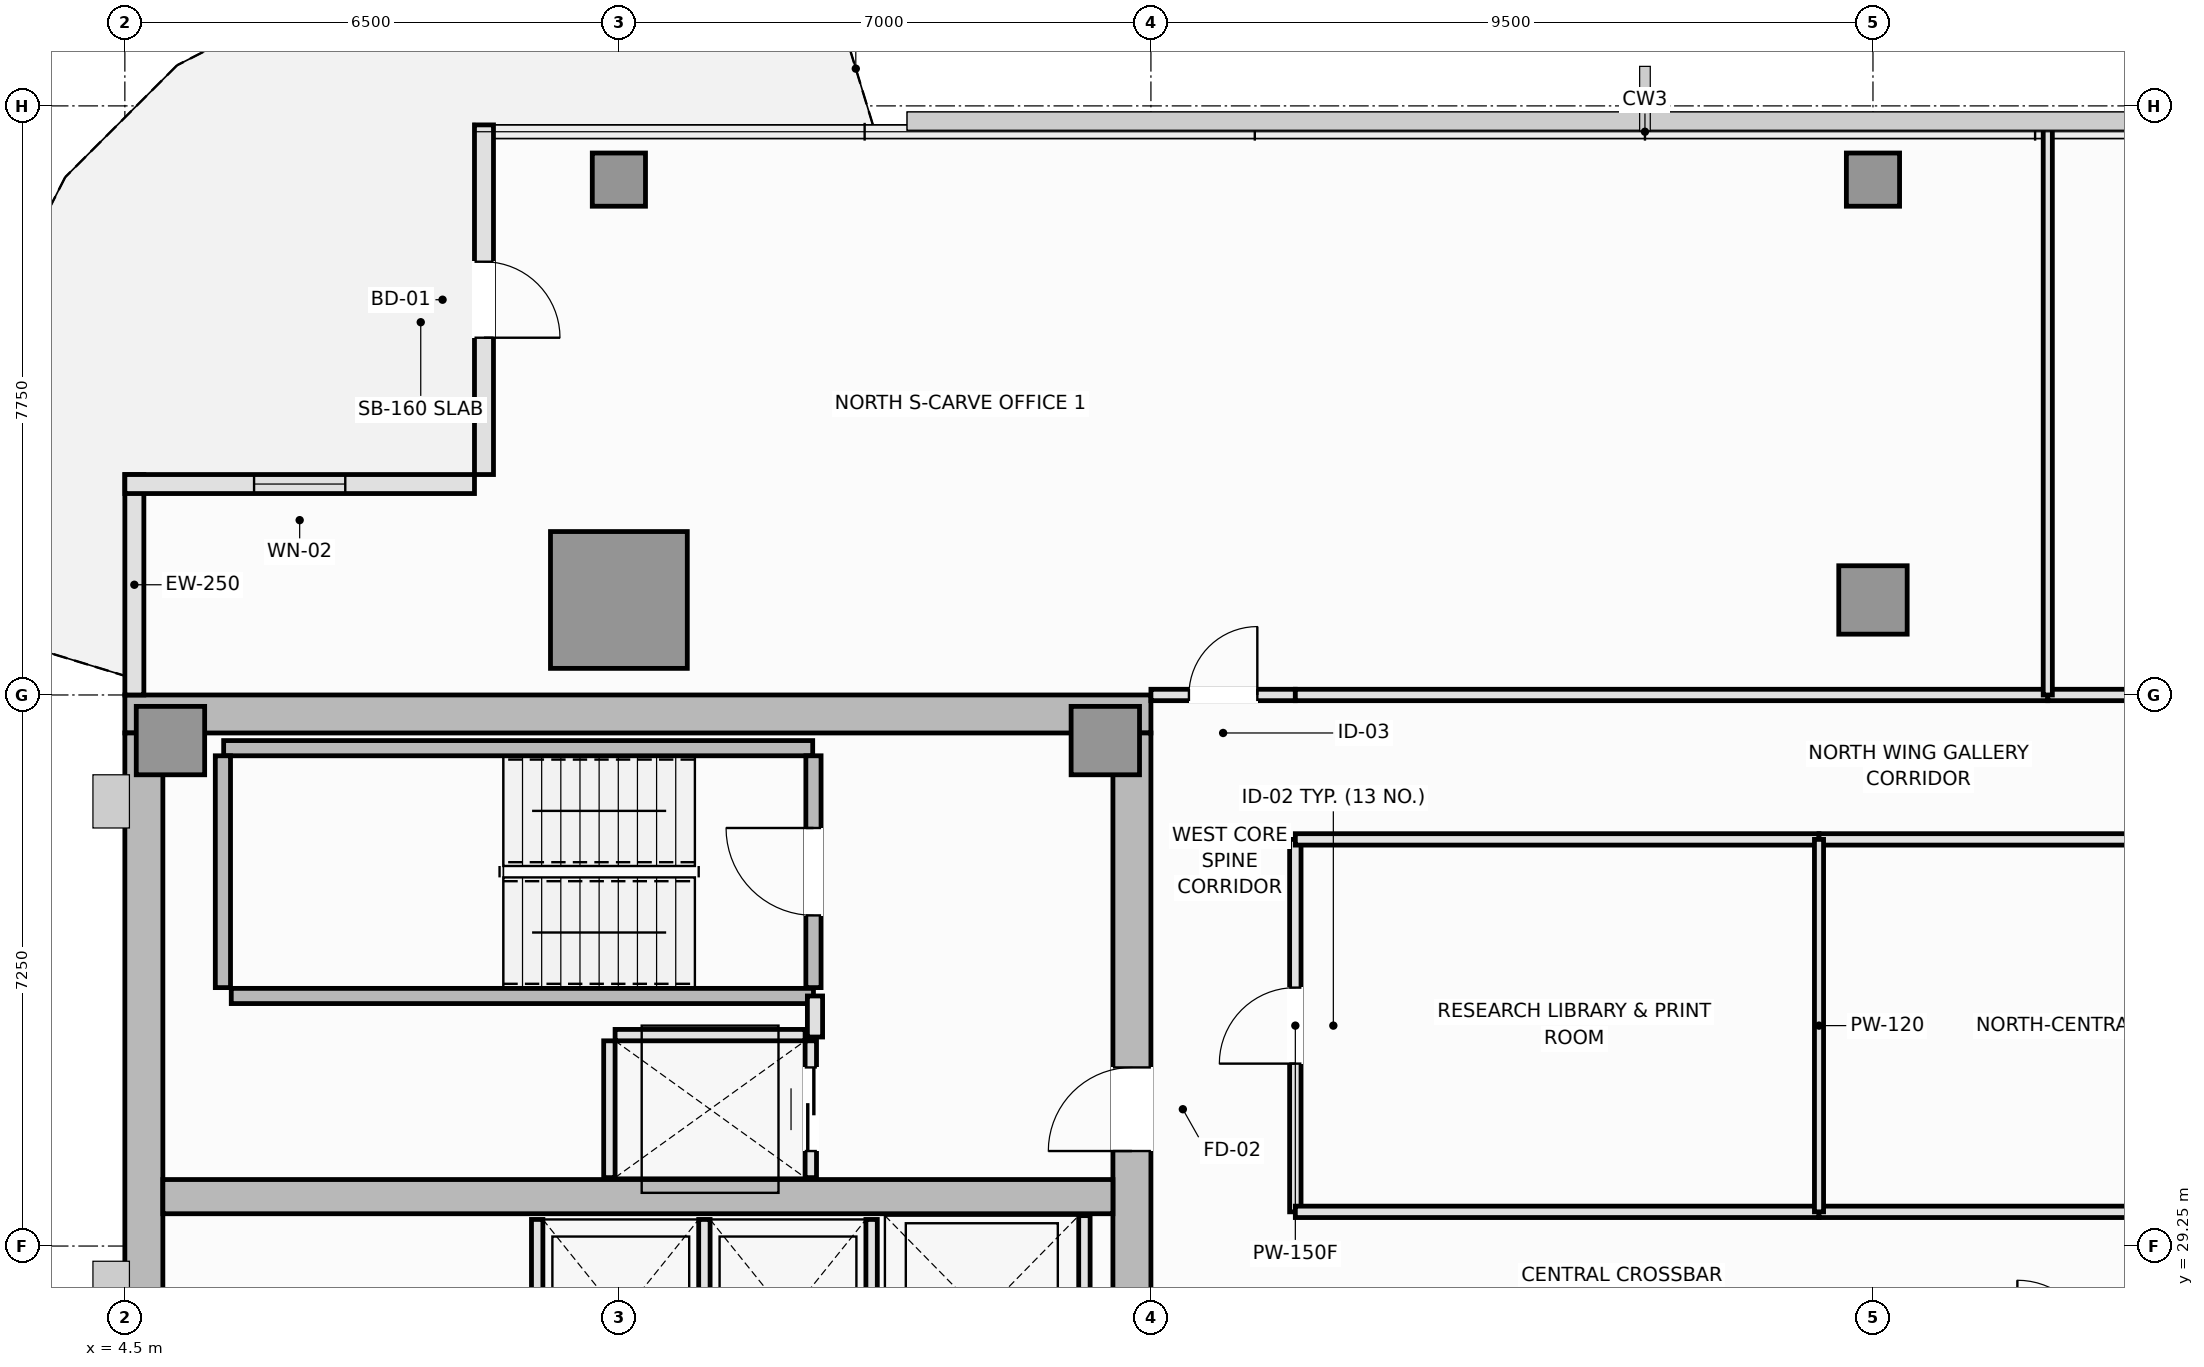
"""IFC4 building model, lengths in metres.
Left out: names, types, materials, properties, quantities, classifications, styles, units other than length and angle.
Written with IfcOpenShell. Run it as: python <this file> out.ifc"""

import sys

from ifc_helpers import new_model, si_unit, direction, frame, frame_2d, origin, origin_2d, place, context, subcontext, project, spatial, rectangle, extrude, element, fill, save


model = new_model("IFC4")
c1 = context("Model", 3, precision=1e-05, world=origin(), true_north=direction((0.0, 1.0)))
c2 = subcontext(c1, "Body", "Model", "MODEL_VIEW")
j1 = project(units=[si_unit("LENGTHUNIT", "METRE"), si_unit("PLANEANGLEUNIT", "RADIAN")], contexts=[c1])
p1 = place(None, origin())
s1 = spatial("IfcSite", under=j1, at=p1, CompositionType="ELEMENT")
p2 = place(p1, origin())
s2 = spatial("IfcBuilding", under=s1, at=p2, CompositionType="ELEMENT")
p3 = place(p2, frame((0.0, 0.0, 281.2)))
s3 = spatial("IfcBuildingStorey", under=s2, at=p3, CompositionType="ELEMENT", Elevation=281.2)
p4 = place(p3, frame((4.5, 36.25, 0.0), z_axis=(0.0, 0.0, 1.0), x_axis=(1.0, 0.0, 0.0)))
e1 = element("IfcWall", 1, at=p4, inside=s3, PredefinedType="SHEAR", context=c2, shape_type="SweptSolid", body=[
    extrude(rectangle(XDim=13.5, YDim=0.5, at=frame_2d((6.75, 0.0))), origin(), (0.0, 0.0, 1.0), 3.55),
])
p5 = place(p3, frame((4.75, 14.5, 0.0), z_axis=(0.0, 0.0, 1.0), x_axis=(0.0, 1.0, 0.0)))
e2 = element("IfcWall", 2, at=p5, inside=s3, PredefinedType="SHEAR", context=c2, shape_type="SweptSolid", body=[
    extrude(rectangle(XDim=21.5, YDim=0.5, at=frame_2d((10.75, 0.0))), origin(), (0.0, 0.0, 1.0), 3.55),
])
p6 = place(p3, frame((17.75, 27.05, 0.0), z_axis=(0.0, 0.0, 1.0), x_axis=(0.0, 1.0, 0.0)))
e3 = element("IfcWall", 3, at=p6, inside=s3, PredefinedType="SHEAR", context=c2, shape_type="SweptSolid", body=[
    extrude(rectangle(XDim=8.95, YDim=0.5, at=frame_2d((4.475, 0.0))), origin(), (0.0, 0.0, 1.0), 3.55),
])
p7 = place(p6, frame((3.45, 0.0, 0.0)))
e4 = element("IfcOpeningElement", 4, at=p7, cuts=e3, PredefinedType="OPENING", context=c2, shape_type="SweptSolid", body=[
    extrude(rectangle(XDim=1.1, YDim=2.15, at=frame_2d((0.55, 1.075))), frame((0.0, 0.26, 0.0), z_axis=(0.0, -1.0, 0.0), x_axis=(1.0, 0.0, 0.0)), (0.0, 0.0, 1.0), 0.52),
])
p8 = place(p3, frame((5.0, 29.9, 0.0), z_axis=(0.0, 0.0, 1.0), x_axis=(1.0, 0.0, 0.0)))
e5 = element("IfcWall", 5, at=p8, inside=s3, PredefinedType="SHEAR", context=c2, shape_type="SweptSolid", body=[
    extrude(rectangle(XDim=12.5, YDim=0.45, at=frame_2d((6.25, 0.0))), origin(), (0.0, 0.0, 1.0), 3.55),
])
for number, where, z_axis, x_axis in (
    (6, (5.1, 35.9, 0.0), (0.0, 0.0, 1.0), (1.0, 0.0, 0.0)),
    (7, (17.4, 35.9, 0.0), (0.0, 0.0, 1.0), (1.0, 0.0, 0.0)),
):
    element("IfcColumn", number, at=place(p3, frame(where, z_axis=z_axis, x_axis=x_axis)), inside=s3, PredefinedType="PILASTER", context=c2, shape_type="SweptSolid", body=[
        extrude(rectangle(XDim=0.9, YDim=0.9, at=origin_2d()), origin(), (0.0, 0.0, 1.0), 3.55),
    ])
p9 = place(p3, frame((11.0, 37.75, 0.0), z_axis=(0.0, 0.0, 1.0), x_axis=(1.0, 0.0, 0.0)))
e8 = element("IfcColumn", 8, at=p9, inside=s3, PredefinedType="COLUMN", context=c2, shape_type="SweptSolid", body=[
    extrude(rectangle(XDim=1.8, YDim=1.8, at=origin_2d()), origin(), (0.0, 0.0, 1.0), 3.55),
])
p10 = place(p3, frame((27.5, 37.75, 0.0), z_axis=(0.0, 0.0, 1.0), x_axis=(1.0, 0.0, 0.0)))
e9 = element("IfcColumn", 9, at=p10, inside=s3, PredefinedType="COLUMN", context=c2, shape_type="SweptSolid", body=[
    extrude(rectangle(XDim=0.9, YDim=0.9, at=origin_2d()), origin(), (0.0, 0.0, 1.0), 3.55),
])
for number, where, z_axis, x_axis in (
    (10, (11.0, 43.28, 0.0), (0.0, 0.0, 1.0), (1.0, 0.0, 0.0)),
    (11, (27.5, 43.28, 0.0), (0.0, 0.0, 1.0), (1.0, 0.0, 0.0)),
):
    element("IfcColumn", number, at=place(p3, frame(where, z_axis=z_axis, x_axis=x_axis)), inside=s3, PredefinedType="COLUMN", context=c2, shape_type="SweptSolid", body=[
        extrude(rectangle(XDim=0.7, YDim=0.7, at=origin_2d()), origin(), (0.0, 0.0, 1.0), 3.55),
    ])
p11 = place(p3, frame((4.625, 39.4, 0.0), z_axis=(0.0, 0.0, 1.0), x_axis=(0.0, -1.0, 0.0)))
e12 = element("IfcWall", 12, at=p11, inside=s3, PredefinedType="SOLIDWALL", context=c2, shape_type="SweptSolid", body=[
    extrude(rectangle(XDim=2.9, YDim=0.25, at=frame_2d((1.45, 0.0))), origin(), (0.0, 0.0, 1.0), 3.39),
])
p12 = place(p3, frame((9.225, 44.0, 0.0), z_axis=(0.0, 0.0, 1.0), x_axis=(0.0, -1.0, 0.0)))
e13 = element("IfcWall", 13, at=p12, inside=s3, PredefinedType="SOLIDWALL", context=c2, shape_type="SweptSolid", body=[
    extrude(rectangle(XDim=4.6, YDim=0.25, at=frame_2d((2.3, 0.0))), origin(), (0.0, 0.0, 1.0), 3.39),
])
p13 = place(p12, frame((1.8, 0.0, 0.0)))
e14 = element("IfcOpeningElement", 14, at=p13, cuts=e13, PredefinedType="OPENING", context=c2, shape_type="SweptSolid", body=[
    extrude(rectangle(XDim=1.0, YDim=2.2, at=frame_2d((0.5, 1.1))), frame((0.0, 0.135, 0.0), z_axis=(0.0, -1.0, 0.0), x_axis=(1.0, 0.0, 0.0)), (0.0, 0.0, 1.0), 0.27),
])
p14 = place(p3, frame((9.1, 39.275, 0.0), z_axis=(0.0, 0.0, 1.0), x_axis=(-1.0, 0.0, 0.0)))
e15 = element("IfcWall", 15, at=p14, inside=s3, PredefinedType="SOLIDWALL", context=c2, shape_type="SweptSolid", body=[
    extrude(rectangle(XDim=4.6, YDim=0.25, at=frame_2d((2.3, 0.0))), origin(), (0.0, 0.0, 1.0), 3.12),
])
p15 = place(p14, frame((1.7, 0.0, 0.9)))
e16 = element("IfcOpeningElement", 16, at=p15, cuts=e15, PredefinedType="OPENING", context=c2, shape_type="SweptSolid", body=[
    extrude(rectangle(XDim=1.2, YDim=1.8, at=frame_2d((0.6, 0.9))), frame((0.0, 0.135, 0.0), z_axis=(0.0, -1.0, 0.0), x_axis=(1.0, 0.0, 0.0)), (0.0, 0.0, 1.0), 0.27),
])
p16 = place(p3, frame((5.8, 35.8, 0.0), z_axis=(0.0, 0.0, 1.0), x_axis=(1.0, 0.0, 0.0)))
e17 = element("IfcWall", 17, at=p16, inside=s3, PredefinedType="SOLIDWALL", context=c2, shape_type="SweptSolid", body=[
    extrude(rectangle(XDim=7.75, YDim=0.2, at=frame_2d((3.875, 0.0))), origin(), (0.0, 0.0, 1.0), 3.55),
])
p17 = place(p3, frame((5.79, 32.65, 0.0), z_axis=(0.0, 0.0, 1.0), x_axis=(0.0, 1.0, 0.0)))
e18 = element("IfcWall", 18, at=p17, inside=s3, PredefinedType="SOLIDWALL", context=c2, shape_type="SweptSolid", body=[
    extrude(rectangle(XDim=3.05, YDim=0.2, at=frame_2d((1.525, 0.0))), origin(), (0.0, 0.0, 1.0), 3.55),
])
p18 = place(p3, frame((5.9, 32.54, 0.0), z_axis=(0.0, 0.0, 1.0), x_axis=(1.0, 0.0, 0.0)))
e19 = element("IfcWall", 19, at=p18, inside=s3, PredefinedType="SOLIDWALL", context=c2, shape_type="SweptSolid", body=[
    extrude(rectangle(XDim=7.66, YDim=0.2, at=frame_2d((3.83, 0.0))), origin(), (0.0, 0.0, 1.0), 3.55),
])
p19 = place(p3, frame((13.56, 32.65, 0.0), z_axis=(0.0, 0.0, 1.0), x_axis=(0.0, 1.0, 0.0)))
e20 = element("IfcWall", 20, at=p19, inside=s3, PredefinedType="SOLIDWALL", context=c2, shape_type="SweptSolid", body=[
    extrude(rectangle(XDim=3.05, YDim=0.2, at=frame_2d((1.525, 0.0))), origin(), (0.0, 0.0, 1.0), 3.55),
])
p20 = place(p19, frame((0.95, 0.0, 0.0)))
e21 = element("IfcOpeningElement", 21, at=p20, cuts=e20, PredefinedType="OPENING", context=c2, shape_type="SweptSolid", body=[
    extrude(rectangle(XDim=1.15, YDim=2.15, at=frame_2d((0.575, 1.075))), frame((0.0, 0.11, 0.0), z_axis=(0.0, -1.0, 0.0), x_axis=(1.0, 0.0, 0.0)), (0.0, 0.0, 1.0), 0.22),
])
for number, where, z_axis, x_axis in (
    (22, (9.925, 27.05, 0.0), (0.0, 0.0, 1.0), (0.0, 1.0, 0.0)),
    (23, (12.125, 27.05, 0.0), (0.0, 0.0, 1.0), (0.0, 1.0, 0.0)),
    (24, (14.325, 27.05, 0.0), (0.0, 0.0, 1.0), (0.0, 1.0, 0.0)),
):
    element("IfcWall", number, at=place(p3, frame(where, z_axis=z_axis, x_axis=x_axis)), inside=s3, PredefinedType="PARTITIONING", context=c2, shape_type="SweptSolid", body=[
        extrude(rectangle(XDim=2.55, YDim=0.15, at=frame_2d((1.275, 0.0))), origin(), (0.0, 0.0, 1.0), 3.39),
    ])
p21 = place(p3, frame((17.125, 27.05, 0.0), z_axis=(0.0, 0.0, 1.0), x_axis=(0.0, 1.0, 0.0)))
e25 = element("IfcWall", 25, at=p21, inside=s3, PredefinedType="PARTITIONING", context=c2, shape_type="SweptSolid", body=[
    extrude(rectangle(XDim=2.6, YDim=0.15, at=frame_2d((1.3, 0.0))), origin(), (0.0, 0.0, 1.0), 3.39),
])
p22 = place(p3, frame((10.95, 32.025, 0.0), z_axis=(0.0, 0.0, 1.0), x_axis=(1.0, 0.0, 0.0)))
e26 = element("IfcWall", 26, at=p22, inside=s3, PredefinedType="PARTITIONING", context=c2, shape_type="SweptSolid", body=[
    extrude(rectangle(XDim=2.5, YDim=0.15, at=frame_2d((1.25, 0.0))), origin(), (0.0, 0.0, 1.0), 3.39),
])
p23 = place(p3, frame((10.875, 30.15, 0.0), z_axis=(0.0, 0.0, 1.0), x_axis=(0.0, 1.0, 0.0)))
e27 = element("IfcWall", 27, at=p23, inside=s3, PredefinedType="PARTITIONING", context=c2, shape_type="SweptSolid", body=[
    extrude(rectangle(XDim=1.8, YDim=0.15, at=frame_2d((0.9, 0.0))), origin(), (0.0, 0.0, 1.0), 3.39),
])
p24 = place(p3, frame((13.525, 30.15, 0.0), z_axis=(0.0, 0.0, 1.0), x_axis=(0.0, 1.0, 0.0)))
e28 = element("IfcWall", 28, at=p24, inside=s3, PredefinedType="PARTITIONING", context=c2, shape_type="SweptSolid", body=[
    extrude(rectangle(XDim=1.8, YDim=0.15, at=frame_2d((0.9, 0.0))), origin(), (0.0, 0.0, 1.0), 3.39),
])
p25 = place(p24, frame((0.35, 0.0, 0.0)))
e29 = element("IfcOpeningElement", 29, at=p25, cuts=e28, PredefinedType="OPENING", context=c2, shape_type="SweptSolid", body=[
    extrude(rectangle(XDim=1.1, YDim=2.2, at=frame_2d((0.55, 1.1))), frame((0.0, 0.085, 0.0), z_axis=(0.0, -1.0, 0.0), x_axis=(1.0, 0.0, 0.0)), (0.0, 0.0, 1.0), 0.17),
])
p26 = place(p3, frame((13.58, 32.0, 0.0), z_axis=(0.0, 0.0, 1.0), x_axis=(0.0, 1.0, 0.0)))
e30 = element("IfcWall", 30, at=p26, inside=s3, PredefinedType="PARTITIONING", context=c2, shape_type="SweptSolid", body=[
    extrude(rectangle(XDim=0.54, YDim=0.2, at=frame_2d((0.27, 0.0))), origin(), (0.0, 0.0, 1.0), 3.39),
])
p27 = place(p3, frame((19.9, 29.7, 0.0), z_axis=(0.0, 0.0, 1.0), x_axis=(0.0, 1.0, 0.0)))
e31 = element("IfcWall", 31, at=p27, inside=s3, PredefinedType="PARTITIONING", context=c2, shape_type="SweptSolid", body=[
    extrude(rectangle(XDim=4.9, YDim=0.15, at=frame_2d((2.45, 0.0))), origin(), (0.0, 0.0, 1.0), 3.39),
])
p28 = place(p27, frame((1.95, 0.0, 0.0)))
e32 = element("IfcOpeningElement", 32, at=p28, cuts=e31, PredefinedType="OPENING", context=c2, shape_type="SweptSolid", body=[
    extrude(rectangle(XDim=1.0, YDim=2.15, at=frame_2d((0.5, 1.075))), frame((0.0, 0.085, 0.0), z_axis=(0.0, -1.0, 0.0), x_axis=(1.0, 0.0, 0.0)), (0.0, 0.0, 1.0), 0.17),
])
p29 = place(p3, frame((18.0, 36.5, 0.0), z_axis=(0.0, 0.0, 1.0), x_axis=(1.0, 0.0, 0.0)))
e33 = element("IfcWall", 33, at=p29, inside=s3, PredefinedType="PARTITIONING", context=c2, shape_type="SweptSolid", body=[
    extrude(rectangle(XDim=1.9, YDim=0.15, at=frame_2d((0.95, 0.0))), origin(), (0.0, 0.0, 1.0), 3.39),
])
p30 = place(p29, frame((0.5, 0.0, 0.0)))
e34 = element("IfcOpeningElement", 34, at=p30, cuts=e33, PredefinedType="OPENING", context=c2, shape_type="SweptSolid", body=[
    extrude(rectangle(XDim=0.9, YDim=2.1, at=frame_2d((0.45, 1.05))), frame((0.0, 0.085, 0.0), z_axis=(0.0, -1.0, 0.0), x_axis=(1.0, 0.0, 0.0)), (0.0, 0.0, 1.0), 0.17),
])
p31 = place(p3, frame((19.9, 29.7, 0.0), z_axis=(0.0, 0.0, 1.0), x_axis=(1.0, 0.0, 0.0)))
e35 = element("IfcWall", 35, at=p31, inside=s3, PredefinedType="PARTITIONING", context=c2, shape_type="SweptSolid", body=[
    extrude(rectangle(XDim=6.89, YDim=0.15, at=frame_2d((3.445, 0.0))), origin(), (0.0, 0.0, 1.0), 3.39),
])
p32 = place(p3, frame((26.79, 29.7, 0.0), z_axis=(0.0, 0.0, 1.0), x_axis=(1.0, 0.0, 0.0)))
e36 = element("IfcWall", 36, at=p32, inside=s3, PredefinedType="PARTITIONING", context=c2, shape_type="SweptSolid", body=[
    extrude(rectangle(XDim=9.51, YDim=0.15, at=frame_2d((4.755, 0.0))), origin(), (0.0, 0.0, 1.0), 3.39),
])
p33 = place(p3, frame((19.9, 34.6, 0.0), z_axis=(0.0, 0.0, 1.0), x_axis=(1.0, 0.0, 0.0)))
e37 = element("IfcWall", 37, at=p33, inside=s3, PredefinedType="PARTITIONING", context=c2, shape_type="SweptSolid", body=[
    extrude(rectangle(XDim=6.89, YDim=0.15, at=frame_2d((3.445, 0.0))), origin(), (0.0, 0.0, 1.0), 3.39),
])
p34 = place(p3, frame((26.79, 34.6, 0.0), z_axis=(0.0, 0.0, 1.0), x_axis=(1.0, 0.0, 0.0)))
e38 = element("IfcWall", 38, at=p34, inside=s3, PredefinedType="PARTITIONING", context=c2, shape_type="SweptSolid", body=[
    extrude(rectangle(XDim=9.51, YDim=0.15, at=frame_2d((4.755, 0.0))), origin(), (0.0, 0.0, 1.0), 3.39),
])
p35 = place(p3, frame((19.9, 36.5, 0.0), z_axis=(0.0, 0.0, 1.0), x_axis=(1.0, 0.0, 0.0)))
e39 = element("IfcWall", 39, at=p35, inside=s3, PredefinedType="PARTITIONING", context=c2, shape_type="SweptSolid", body=[
    extrude(rectangle(XDim=9.9, YDim=0.15, at=frame_2d((4.95, 0.0))), origin(), (0.0, 0.0, 1.0), 3.39),
])
p36 = place(p3, frame((29.8, 36.5, 0.0), z_axis=(0.0, 0.0, 1.0), x_axis=(1.0, 0.0, 0.0)))
e40 = element("IfcWall", 40, at=p36, inside=s3, PredefinedType="PARTITIONING", context=c2, shape_type="SweptSolid", body=[
    extrude(rectangle(XDim=4.2, YDim=0.15, at=frame_2d((2.1, 0.0))), origin(), (0.0, 0.0, 1.0), 3.39),
])
p37 = place(p36, frame((1.6, 0.0, 0.0)))
e41 = element("IfcOpeningElement", 41, at=p37, cuts=e40, PredefinedType="OPENING", context=c2, shape_type="SweptSolid", body=[
    extrude(rectangle(XDim=1.0, YDim=2.15, at=frame_2d((0.5, 1.075))), frame((0.0, 0.085, 0.0), z_axis=(0.0, -1.0, 0.0), x_axis=(1.0, 0.0, 0.0)), (0.0, 0.0, 1.0), 0.17),
])
p38 = place(p3, frame((26.79, 29.7, 0.0), z_axis=(0.0, 0.0, 1.0), x_axis=(0.0, 1.0, 0.0)))
e42 = element("IfcWall", 42, at=p38, inside=s3, PredefinedType="PARTITIONING", context=c2, shape_type="SweptSolid", body=[
    extrude(rectangle(XDim=4.9, YDim=0.12, at=frame_2d((2.45, 0.0))), origin(), (0.0, 0.0, 1.0), 3.39),
])
p39 = place(p3, frame((29.8, 36.5, 0.0), z_axis=(0.0, 0.0, 1.0), x_axis=(0.0, 1.0, 0.0)))
e43 = element("IfcWall", 43, at=p39, inside=s3, PredefinedType="PARTITIONING", context=c2, shape_type="SweptSolid", body=[
    extrude(rectangle(XDim=7.49, YDim=0.12, at=frame_2d((3.745, 0.0))), origin(), (0.0, 0.0, 1.0), 3.39),
])
p40 = place(p13, frame((1.0, 0.0, 0.0), z_axis=(0.0, 0.0, 1.0), x_axis=(-1.0, 0.0, 0.0)))
e44 = element("IfcDoor", 44, at=p40, inside=s3, OperationType="SINGLE_SWING_RIGHT", PredefinedType="DOOR", context=c2, shape_type="SweptSolid", body=[
    extrude(rectangle(XDim=1.0, YDim=2.2, at=frame_2d((0.5, 1.1))), frame((0.0, 0.025, 0.0), z_axis=(0.0, -1.0, 0.0), x_axis=(1.0, 0.0, 0.0)), (0.0, 0.0, 1.0), 0.05),
])
fill(e14, e44)
p41 = place(p15, origin())
e45 = element("IfcWindow", 45, at=p41, inside=s3, PartitioningType="SINGLE_PANEL", PredefinedType="WINDOW", context=c2, shape_type="SweptSolid", body=[
    extrude(rectangle(XDim=1.2, YDim=1.8, at=frame_2d((0.6, 0.9))), frame((0.0, 0.03, 0.0), z_axis=(0.0, -1.0, 0.0), x_axis=(1.0, 0.0, 0.0)), (0.0, 0.0, 1.0), 0.06),
])
fill(e16, e45)
p42 = place(p20, origin())
e46 = element("IfcDoor", 46, at=p42, inside=s3, OperationType="SINGLE_SWING_RIGHT", PredefinedType="DOOR", context=c2, shape_type="SweptSolid", body=[
    extrude(rectangle(XDim=1.15, YDim=2.15, at=frame_2d((0.575, 1.075))), frame((0.0, 0.025, 0.0), z_axis=(0.0, -1.0, 0.0), x_axis=(1.0, 0.0, 0.0)), (0.0, 0.0, 1.0), 0.05),
])
fill(e21, e46)
p43 = place(p25, origin())
e47 = element("IfcDoor", 47, at=p43, inside=s3, OperationType="DOUBLE_DOOR_SLIDING", PredefinedType="DOOR", context=c2, shape_type="SweptSolid", body=[
    extrude(rectangle(XDim=1.1, YDim=2.2, at=frame_2d((0.55, 1.1))), frame((0.0, 0.025, 0.0), z_axis=(0.0, -1.0, 0.0), x_axis=(1.0, 0.0, 0.0)), (0.0, 0.0, 1.0), 0.05),
])
fill(e29, e47)
p44 = place(p7, origin())
e48 = element("IfcDoor", 48, at=p44, inside=s3, OperationType="SINGLE_SWING_LEFT", PredefinedType="DOOR", context=c2, shape_type="SweptSolid", body=[
    extrude(rectangle(XDim=1.1, YDim=2.15, at=frame_2d((0.55, 1.075))), frame((0.0, 0.025, 0.0), z_axis=(0.0, -1.0, 0.0), x_axis=(1.0, 0.0, 0.0)), (0.0, 0.0, 1.0), 0.05),
])
fill(e4, e48)
p45 = place(p28, origin())
e49 = element("IfcDoor", 49, at=p45, inside=s3, OperationType="SINGLE_SWING_LEFT", PredefinedType="DOOR", context=c2, shape_type="SweptSolid", body=[
    extrude(rectangle(XDim=1.0, YDim=2.15, at=frame_2d((0.5, 1.075))), frame((0.0, 0.025, 0.0), z_axis=(0.0, -1.0, 0.0), x_axis=(1.0, 0.0, 0.0)), (0.0, 0.0, 1.0), 0.05),
])
fill(e32, e49)
p46 = place(p30, origin())
e50 = element("IfcDoor", 50, at=p46, inside=s3, OperationType="SINGLE_SWING_RIGHT", PredefinedType="DOOR", context=c2, shape_type="SweptSolid", body=[
    extrude(rectangle(XDim=0.9, YDim=2.1, at=frame_2d((0.45, 1.05))), frame((0.0, 0.025, 0.0), z_axis=(0.0, -1.0, 0.0), x_axis=(1.0, 0.0, 0.0)), (0.0, 0.0, 1.0), 0.05),
])
fill(e34, e50)
save(model, sys.argv[1])
